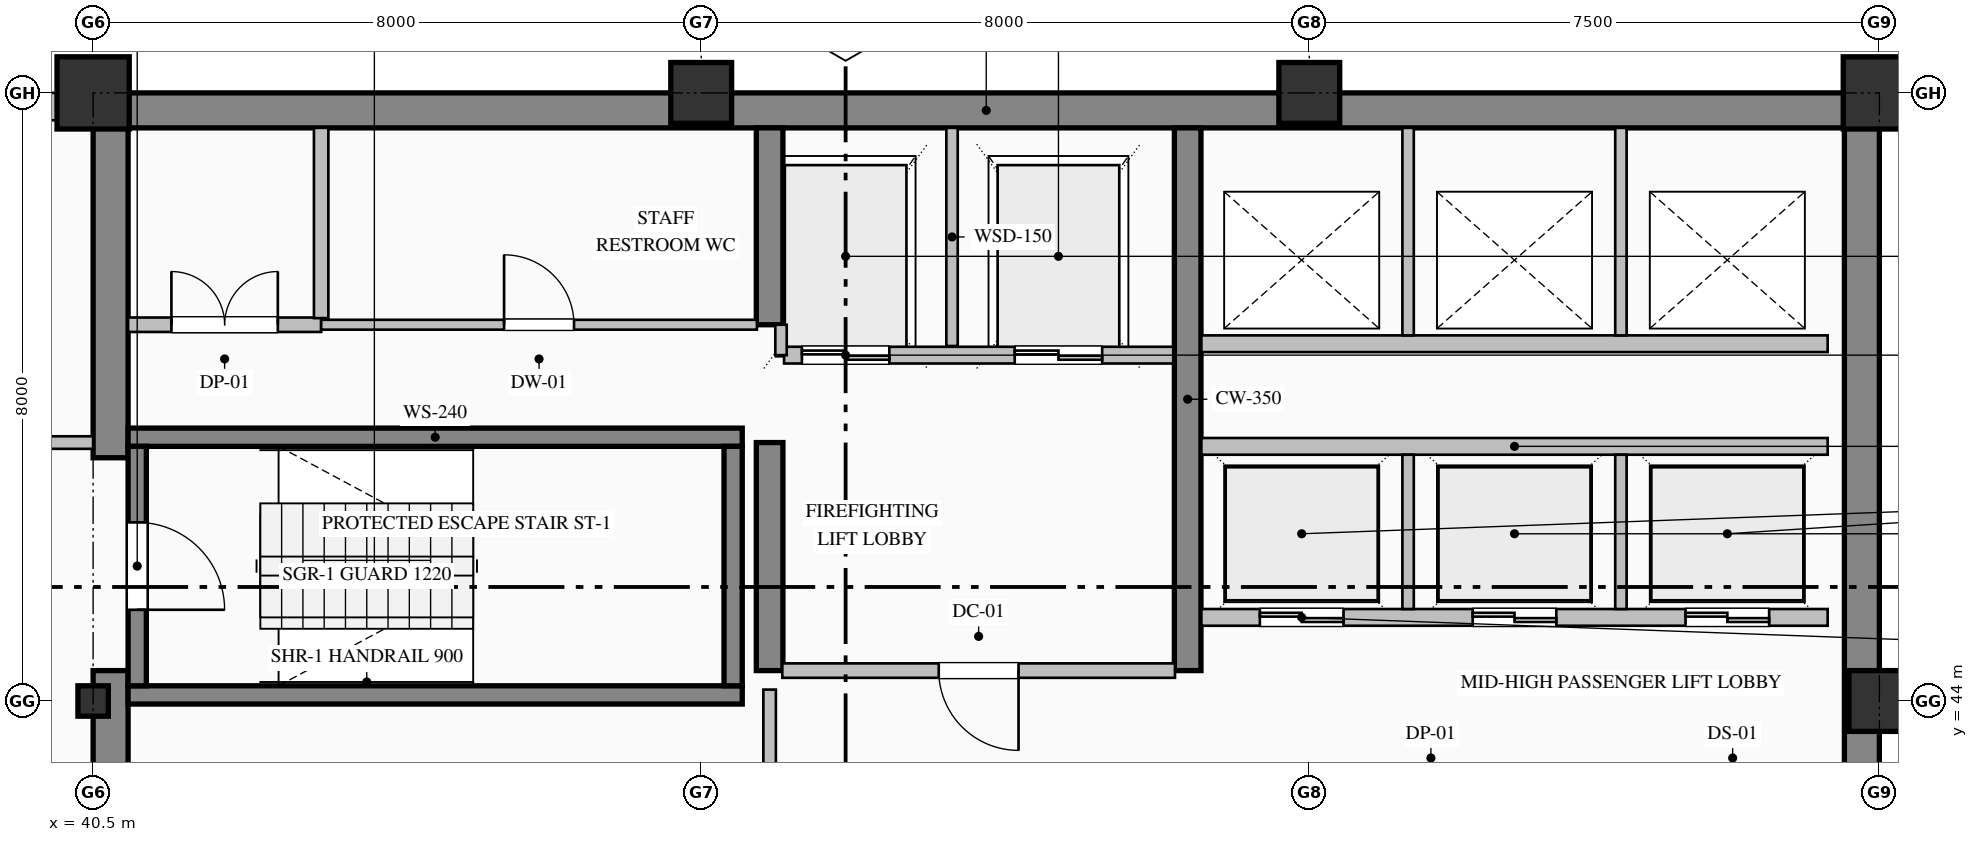
"""IFC4 building model, lengths in metres.
Left out: names, types, materials, properties, quantities, classifications, styles, units other than length and angle.
Written with IfcOpenShell. Run it as: python <this file> out.ifc"""

import sys

from ifc_helpers import new_model, si_unit, direction, frame, frame_2d, origin, origin_2d, place, context, subcontext, project, spatial, rectangle, hollow_rectangle, i_section, extrude, element, fill, save


model = new_model("IFC4")
c1 = context("Model", 3, precision=1e-05, world=origin(), true_north=direction((0.0, 1.0)))
c2 = subcontext(c1, "Body", "Model", "MODEL_VIEW")
j1 = project(units=[si_unit("LENGTHUNIT", "METRE"), si_unit("PLANEANGLEUNIT", "RADIAN")], contexts=[c1])
p1 = place(None, origin())
s1 = spatial("IfcSite", under=j1, at=p1, CompositionType="ELEMENT")
p2 = place(p1, origin())
s2 = spatial("IfcBuilding", under=s1, at=p2, CompositionType="ELEMENT")
p3 = place(p2, frame((0.0, 0.0, 229.8)))
s3 = spatial("IfcBuildingStorey", under=s2, at=p3, CompositionType="ELEMENT", Elevation=229.8)
p4 = place(p3, frame((40.5, 51.77, 0.0), z_axis=(0.0, 0.0, 1.0), x_axis=(1.0, 0.0, 0.0)))
e1 = element("IfcWall", 1, at=p4, inside=s3, PredefinedType="SHEAR", context=c2, shape_type="SweptSolid", body=[
    extrude(rectangle(XDim=23.5, YDim=0.46, at=frame_2d((11.75, 0.0))), origin(), (0.0, 0.0, 1.0), 3.775),
])
p5 = place(p3, frame((63.77, 36.32, 0.0), z_axis=(0.0, 0.0, 1.0), x_axis=(0.0, 1.0, 0.0)))
e2 = element("IfcWall", 2, at=p5, inside=s3, PredefinedType="SHEAR", context=c2, shape_type="SweptSolid", body=[
    extrude(rectangle(XDim=15.22, YDim=0.46, at=frame_2d((7.61, 0.0))), origin(), (0.0, 0.0, 1.0), 3.775),
])
p6 = place(p3, frame((40.73, 36.46, 0.0), z_axis=(0.0, 0.0, 1.0), x_axis=(0.0, 1.0, 0.0)))
e3 = element("IfcWall", 3, at=p6, inside=s3, PredefinedType="SHEAR", context=c2, shape_type="SweptSolid", body=[
    extrude(rectangle(XDim=7.94, YDim=0.46, at=frame_2d((3.97, 0.0))), origin(), (0.0, 0.0, 1.0), 3.775),
])
p7 = place(p3, frame((40.73, 47.2, 0.0), z_axis=(0.0, 0.0, 1.0), x_axis=(0.0, 1.0, 0.0)))
e4 = element("IfcWall", 4, at=p7, inside=s3, PredefinedType="SHEAR", context=c2, shape_type="SweptSolid", body=[
    extrude(rectangle(XDim=4.34, YDim=0.46, at=frame_2d((2.17, 0.0))), origin(), (0.0, 0.0, 1.0), 3.775),
])
p8 = place(p3, frame((49.4, 44.4, 0.0), z_axis=(0.0, 0.0, 1.0), x_axis=(0.0, 1.0, 0.0)))
e5 = element("IfcWall", 5, at=p8, inside=s3, PredefinedType="SHEAR", context=c2, shape_type="SweptSolid", body=[
    extrude(rectangle(XDim=3.0, YDim=0.35, at=frame_2d((1.5, 0.0))), origin(), (0.0, 0.0, 1.0), 3.775),
])
p9 = place(p3, frame((49.4, 48.95, 0.0), z_axis=(0.0, 0.0, 1.0), x_axis=(0.0, 1.0, 0.0)))
e6 = element("IfcWall", 6, at=p9, inside=s3, PredefinedType="SHEAR", context=c2, shape_type="SweptSolid", body=[
    extrude(rectangle(XDim=2.59, YDim=0.35, at=frame_2d((1.295, 0.0))), origin(), (0.0, 0.0, 1.0), 3.775),
])
p10 = place(p3, frame((54.9, 44.4, 0.0), z_axis=(0.0, 0.0, 1.0), x_axis=(0.0, 1.0, 0.0)))
e7 = element("IfcWall", 7, at=p10, inside=s3, PredefinedType="SHEAR", context=c2, shape_type="SweptSolid", body=[
    extrude(rectangle(XDim=7.14, YDim=0.35, at=frame_2d((3.57, 0.0))), origin(), (0.0, 0.0, 1.0), 3.775),
])
p11 = place(p3, frame((40.5, 44.0, 0.0), z_axis=(0.0, 0.0, 1.0), x_axis=(1.0, 0.0, 0.0)))
e8 = element("IfcColumn", 8, at=p11, inside=s3, PredefinedType="COLUMN", context=c2, shape_type="SweptSolid", body=[
    extrude(i_section(OverallWidth=0.4, OverallDepth=0.4, WebThickness=0.013, FlangeThickness=0.021, FilletRadius=0.022, at=origin_2d()), origin(), (0.0, 0.0, 1.0), 4.0),
])
p12 = place(p3, frame((40.5, 52.0, 0.0), z_axis=(0.0, 0.0, 1.0), x_axis=(1.0, 0.0, 0.0)))
e9 = element("IfcColumn", 9, at=p12, inside=s3, PredefinedType="COLUMN", context=c2, shape_type="SweptSolid", body=[
    extrude(hollow_rectangle(XDim=0.95, YDim=0.95, WallThickness=0.036, at=origin_2d()), origin(), (0.0, 0.0, 1.0), 4.0),
])
for number, where, z_axis, x_axis in (
    (10, (48.5, 52.0, 0.0), (0.0, 0.0, 1.0), (1.0, 0.0, 0.0)),
    (11, (56.5, 52.0, 0.0), (0.0, 0.0, 1.0), (1.0, 0.0, 0.0)),
    (12, (64.0, 44.0, 0.0), (0.0, 0.0, 1.0), (1.0, 0.0, 0.0)),
):
    element("IfcColumn", number, at=place(p3, frame(where, z_axis=z_axis, x_axis=x_axis)), inside=s3, PredefinedType="COLUMN", context=c2, shape_type="SweptSolid", body=[
        extrude(hollow_rectangle(XDim=0.8, YDim=0.8, WallThickness=0.032, at=origin_2d()), origin(), (0.0, 0.0, 1.0), 4.0),
    ])
p13 = place(p3, frame((64.0, 52.0, 0.0), z_axis=(0.0, 0.0, 1.0), x_axis=(1.0, 0.0, 0.0)))
e13 = element("IfcColumn", 13, at=p13, inside=s3, PredefinedType="COLUMN", context=c2, shape_type="SweptSolid", body=[
    extrude(hollow_rectangle(XDim=0.95, YDim=0.95, WallThickness=0.036, at=origin_2d()), origin(), (0.0, 0.0, 1.0), 4.0),
])
p14 = place(p3, frame((13.0, 51.82, 0.0), z_axis=(0.0, 0.0, 1.0), x_axis=(1.0, 0.0, 0.0)))
e14 = element("IfcWall", 14, at=p14, inside=s3, PredefinedType="SOLIDWALL", context=c2, shape_type="SweptSolid", body=[
    extrude(rectangle(XDim=27.52, YDim=0.36, at=frame_2d((13.76, 0.0))), origin(), (0.0, 0.0, 1.0), 3.325),
])
p15 = place(p14, frame((6.525, 0.0, 0.9)))
e15 = element("IfcOpeningElement", 15, at=p15, cuts=e14, PredefinedType="OPENING", context=c2, shape_type="SweptSolid", body=[
    extrude(rectangle(XDim=1.35, YDim=1.85, at=frame_2d((0.675, 0.925))), frame((0.0, 0.19, 0.0), z_axis=(0.0, -1.0, 0.0), x_axis=(1.0, 0.0, 0.0)), (0.0, 0.0, 1.0), 0.38),
])
for number, where, z_axis, x_axis in (
    (16, (40.96, 47.47, 0.0), (0.0, 0.0, 1.0), (1.0, 0.0, 0.0)),
    (17, (49.04, 44.08, 0.0), (0.0, 0.0, 1.0), (-1.0, 0.0, 0.0)),
):
    element("IfcWall", number, at=place(p3, frame(where, z_axis=z_axis, x_axis=x_axis)), inside=s3, PredefinedType="SOLIDWALL", context=c2, shape_type="SweptSolid", body=[
        extrude(rectangle(XDim=8.08, YDim=0.24, at=frame_2d((4.04, 0.0))), origin(), (0.0, 0.0, 1.0), 4.0),
    ])
p16 = place(p3, frame((41.08, 47.35, 0.0), z_axis=(0.0, 0.0, 1.0), x_axis=(0.0, -1.0, 0.0)))
e18 = element("IfcWall", 18, at=p16, inside=s3, PredefinedType="SOLIDWALL", context=c2, shape_type="SweptSolid", body=[
    extrude(rectangle(XDim=3.15, YDim=0.24, at=frame_2d((1.575, 0.0))), origin(), (0.0, 0.0, 1.0), 4.0),
])
p17 = place(p16, frame((1.0, 0.0, 0.0)))
e19 = element("IfcOpeningElement", 19, at=p17, cuts=e18, PredefinedType="OPENING", context=c2, shape_type="SweptSolid", body=[
    extrude(rectangle(XDim=1.15, YDim=2.2, at=frame_2d((0.575, 1.1))), frame((0.0, 0.13, 0.0), z_axis=(0.0, -1.0, 0.0), x_axis=(1.0, 0.0, 0.0)), (0.0, 0.0, 1.0), 0.26),
])
p18 = place(p3, frame((48.92, 44.2, 0.0), z_axis=(0.0, 0.0, 1.0), x_axis=(0.0, 1.0, 0.0)))
e20 = element("IfcWall", 20, at=p18, inside=s3, PredefinedType="SOLIDWALL", context=c2, shape_type="SweptSolid", body=[
    extrude(rectangle(XDim=3.15, YDim=0.24, at=frame_2d((1.575, 0.0))), origin(), (0.0, 0.0, 1.0), 4.0),
])
p19 = place(p3, frame((54.71, 48.55, 0.0), z_axis=(0.0, 0.0, 1.0), x_axis=(-1.0, 0.0, 0.0)))
e21 = element("IfcWall", 21, at=p19, inside=s3, PredefinedType="PARTITIONING", context=c2, shape_type="SweptSolid", body=[
    extrude(rectangle(XDim=5.12, YDim=0.22, at=frame_2d((2.56, 0.0))), origin(), (0.0, 0.0, 1.0), 3.775),
])
p20 = place(p19, frame((3.735, 0.0, 0.0)))
e22 = element("IfcOpeningElement", 22, at=p20, cuts=e21, PredefinedType="OPENING", context=c2, shape_type="SweptSolid", body=[
    extrude(rectangle(XDim=1.15, YDim=2.2, at=frame_2d((0.575, 1.1))), frame((0.0, 0.12, 0.0), z_axis=(0.0, -1.0, 0.0), x_axis=(1.0, 0.0, 0.0)), (0.0, 0.0, 1.0), 0.24),
])
p21 = place(p19, frame((0.935, 0.0, 0.0)))
e23 = element("IfcOpeningElement", 23, at=p21, cuts=e21, PredefinedType="OPENING", context=c2, shape_type="SweptSolid", body=[
    extrude(rectangle(XDim=1.15, YDim=2.2, at=frame_2d((0.575, 1.1))), frame((0.0, 0.12, 0.0), z_axis=(0.0, -1.0, 0.0), x_axis=(1.0, 0.0, 0.0)), (0.0, 0.0, 1.0), 0.24),
])
p22 = place(p3, frame((51.8, 48.67, 0.0), z_axis=(0.0, 0.0, 1.0), x_axis=(0.0, 1.0, 0.0)))
e24 = element("IfcWall", 24, at=p22, inside=s3, PredefinedType="PARTITIONING", context=c2, shape_type="SweptSolid", body=[
    extrude(rectangle(XDim=2.87, YDim=0.15, at=frame_2d((1.435, 0.0))), origin(), (0.0, 0.0, 1.0), 3.775),
])
p23 = place(p3, frame((49.55, 48.55, 0.0), z_axis=(0.0, 0.0, 1.0), x_axis=(0.0, 1.0, 0.0)))
e25 = element("IfcWall", 25, at=p23, inside=s3, PredefinedType="PARTITIONING", context=c2, shape_type="SweptSolid", body=[
    extrude(rectangle(XDim=0.4, YDim=0.15, at=frame_2d((0.2, 0.0))), origin(), (0.0, 0.0, 1.0), 3.775),
])
p24 = place(p3, frame((63.32, 45.1, 0.0), z_axis=(0.0, 0.0, 1.0), x_axis=(-1.0, 0.0, 0.0)))
e26 = element("IfcWall", 26, at=p24, inside=s3, PredefinedType="PARTITIONING", context=c2, shape_type="SweptSolid", body=[
    extrude(rectangle(XDim=8.24, YDim=0.22, at=frame_2d((4.12, 0.0))), origin(), (0.0, 0.0, 1.0), 3.775),
])
p25 = place(p24, frame((6.37, 0.0, 0.0)))
e27 = element("IfcOpeningElement", 27, at=p25, cuts=e26, PredefinedType="OPENING", context=c2, shape_type="SweptSolid", body=[
    extrude(rectangle(XDim=1.1, YDim=2.2, at=frame_2d((0.55, 1.1))), frame((0.0, 0.12, 0.0), z_axis=(0.0, -1.0, 0.0), x_axis=(1.0, 0.0, 0.0)), (0.0, 0.0, 1.0), 0.24),
])
p26 = place(p24, frame((3.57, 0.0, 0.0)))
e28 = element("IfcOpeningElement", 28, at=p26, cuts=e26, PredefinedType="OPENING", context=c2, shape_type="SweptSolid", body=[
    extrude(rectangle(XDim=1.1, YDim=2.2, at=frame_2d((0.55, 1.1))), frame((0.0, 0.12, 0.0), z_axis=(0.0, -1.0, 0.0), x_axis=(1.0, 0.0, 0.0)), (0.0, 0.0, 1.0), 0.24),
])
p27 = place(p24, frame((0.77, 0.0, 0.0)))
e29 = element("IfcOpeningElement", 29, at=p27, cuts=e26, PredefinedType="OPENING", context=c2, shape_type="SweptSolid", body=[
    extrude(rectangle(XDim=1.1, YDim=2.2, at=frame_2d((0.55, 1.1))), frame((0.0, 0.12, 0.0), z_axis=(0.0, -1.0, 0.0), x_axis=(1.0, 0.0, 0.0)), (0.0, 0.0, 1.0), 0.24),
])
p28 = place(p3, frame((55.08, 47.35, 0.0), z_axis=(0.0, 0.0, 1.0), x_axis=(1.0, 0.0, 0.0)))
e30 = element("IfcWall", 30, at=p28, inside=s3, PredefinedType="PARTITIONING", context=c2, shape_type="SweptSolid", body=[
    extrude(rectangle(XDim=8.24, YDim=0.22, at=frame_2d((4.12, 0.0))), origin(), (0.0, 0.0, 1.0), 3.775),
])
for number, where, z_axis, x_axis in (
    (31, (57.8, 45.21, 0.0), (0.0, 0.0, 1.0), (0.0, 1.0, 0.0)),
    (32, (60.6, 45.21, 0.0), (0.0, 0.0, 1.0), (0.0, 1.0, 0.0)),
):
    element("IfcWall", number, at=place(p3, frame(where, z_axis=z_axis, x_axis=x_axis)), inside=s3, PredefinedType="PARTITIONING", context=c2, shape_type="SweptSolid", body=[
        extrude(rectangle(XDim=2.03, YDim=0.15, at=frame_2d((1.015, 0.0))), origin(), (0.0, 0.0, 1.0), 3.775),
    ])
p29 = place(p3, frame((63.32, 48.7, 0.0), z_axis=(0.0, 0.0, 1.0), x_axis=(-1.0, 0.0, 0.0)))
e33 = element("IfcWall", 33, at=p29, inside=s3, PredefinedType="PARTITIONING", context=c2, shape_type="SweptSolid", body=[
    extrude(rectangle(XDim=8.24, YDim=0.22, at=frame_2d((4.12, 0.0))), origin(), (0.0, 0.0, 1.0), 3.775),
])
for number, where, z_axis, x_axis in (
    (34, (57.8, 48.81, 0.0), (0.0, 0.0, 1.0), (0.0, 1.0, 0.0)),
    (35, (60.6, 48.81, 0.0), (0.0, 0.0, 1.0), (0.0, 1.0, 0.0)),
):
    element("IfcWall", number, at=place(p3, frame(where, z_axis=z_axis, x_axis=x_axis)), inside=s3, PredefinedType="PARTITIONING", context=c2, shape_type="SweptSolid", body=[
        extrude(rectangle(XDim=2.73, YDim=0.15, at=frame_2d((1.365, 0.0))), origin(), (0.0, 0.0, 1.0), 3.775),
    ])
p30 = place(p3, frame((37.8, 47.4, 0.0), z_axis=(0.0, 0.0, 1.0), x_axis=(1.0, 0.0, 0.0)))
e36 = element("IfcWall", 36, at=p30, inside=s3, PredefinedType="PARTITIONING", context=c2, shape_type="SweptSolid", body=[
    extrude(rectangle(XDim=2.7, YDim=0.165, at=frame_2d((1.35, 0.0))), origin(), (0.0, 0.0, 1.0), 3.775),
])
p31 = place(p30, frame((0.825, 0.0, 0.0)))
e37 = element("IfcOpeningElement", 37, at=p31, cuts=e36, PredefinedType="OPENING", context=c2, shape_type="SweptSolid", body=[
    extrude(rectangle(XDim=1.05, YDim=2.15, at=frame_2d((0.525, 1.075))), frame((0.0, 0.093, 0.0), z_axis=(0.0, -1.0, 0.0), x_axis=(1.0, 0.0, 0.0)), (0.0, 0.0, 1.0), 0.185),
])
p32 = place(p3, frame((40.96, 48.95, 0.0), z_axis=(0.0, 0.0, 1.0), x_axis=(1.0, 0.0, 0.0)))
e38 = element("IfcWall", 38, at=p32, inside=s3, PredefinedType="PARTITIONING", context=c2, shape_type="SweptSolid", body=[
    extrude(rectangle(XDim=2.54, YDim=0.19, at=frame_2d((1.27, 0.0))), origin(), (0.0, 0.0, 1.0), 3.775),
])
p33 = place(p32, frame((0.57, 0.0, 0.0)))
e39 = element("IfcOpeningElement", 39, at=p33, cuts=e38, PredefinedType="OPENING", context=c2, shape_type="SweptSolid", body=[
    extrude(rectangle(XDim=1.4, YDim=2.25, at=frame_2d((0.7, 1.125))), frame((0.0, 0.105, 0.0), z_axis=(0.0, -1.0, 0.0), x_axis=(1.0, 0.0, 0.0)), (0.0, 0.0, 1.0), 0.21),
])
p34 = place(p3, frame((43.5, 48.95, 0.0), z_axis=(0.0, 0.0, 1.0), x_axis=(1.0, 0.0, 0.0)))
e40 = element("IfcWall", 40, at=p34, inside=s3, PredefinedType="PARTITIONING", context=c2, shape_type="SweptSolid", body=[
    extrude(rectangle(XDim=5.733, YDim=0.13, at=frame_2d((2.866, 0.0))), origin(), (0.0, 0.0, 1.0), 3.775),
])
p35 = place(p34, frame((2.406, 0.0, 0.0)))
e41 = element("IfcOpeningElement", 41, at=p35, cuts=e40, PredefinedType="OPENING", context=c2, shape_type="SweptSolid", body=[
    extrude(rectangle(XDim=0.92, YDim=2.15, at=frame_2d((0.46, 1.075))), frame((0.0, 0.075, 0.0), z_axis=(0.0, -1.0, 0.0), x_axis=(1.0, 0.0, 0.0)), (0.0, 0.0, 1.0), 0.15),
])
p36 = place(p3, frame((54.733, 44.4, 0.0), z_axis=(0.0, 0.0, 1.0), x_axis=(-1.0, 0.0, 0.0)))
e42 = element("IfcWall", 42, at=p36, inside=s3, PredefinedType="PARTITIONING", context=c2, shape_type="SweptSolid", body=[
    extrude(rectangle(XDim=5.166, YDim=0.19, at=frame_2d((2.583, 0.0))), origin(), (0.0, 0.0, 1.0), 3.775),
])
p37 = place(p36, frame((2.058, 0.0, 0.0)))
e43 = element("IfcOpeningElement", 43, at=p37, cuts=e42, PredefinedType="OPENING", context=c2, shape_type="SweptSolid", body=[
    extrude(rectangle(XDim=1.05, YDim=2.15, at=frame_2d((0.525, 1.075))), frame((0.0, 0.105, 0.0), z_axis=(0.0, -1.0, 0.0), x_axis=(1.0, 0.0, 0.0)), (0.0, 0.0, 1.0), 0.21),
])
p38 = place(p3, frame((49.4, 36.46, 0.0), z_axis=(0.0, 0.0, 1.0), x_axis=(0.0, 1.0, 0.0)))
e44 = element("IfcWall", 44, at=p38, inside=s3, PredefinedType="PARTITIONING", context=c2, shape_type="SweptSolid", body=[
    extrude(rectangle(XDim=7.69, YDim=0.165, at=frame_2d((3.845, 0.0))), origin(), (0.0, 0.0, 1.0), 3.017),
])
p39 = place(p38, frame((3.345, 0.0, 0.0)))
e45 = element("IfcOpeningElement", 45, at=p39, cuts=e44, PredefinedType="OPENING", context=c2, shape_type="SweptSolid", body=[
    extrude(rectangle(XDim=1.0, YDim=2.15, at=frame_2d((0.5, 1.075))), frame((0.0, 0.093, 0.0), z_axis=(0.0, -1.0, 0.0), x_axis=(1.0, 0.0, 0.0)), (0.0, 0.0, 1.0), 0.185),
])
p40 = place(p3, frame((43.5, 51.54, 0.0), z_axis=(0.0, 0.0, 1.0), x_axis=(0.0, -1.0, 0.0)))
e46 = element("IfcWall", 46, at=p40, inside=s3, PredefinedType="PARTITIONING", context=c2, shape_type="SweptSolid", body=[
    extrude(rectangle(XDim=2.503, YDim=0.19, at=frame_2d((1.251, 0.0))), origin(), (0.0, 0.0, 1.0), 3.775),
])
p41 = place(p17, origin())
e47 = element("IfcDoor", 47, at=p41, inside=s3, OperationType="SINGLE_SWING_RIGHT", PredefinedType="DOOR", context=c2, shape_type="SweptSolid", body=[
    extrude(rectangle(XDim=1.15, YDim=2.2, at=frame_2d((0.575, 1.1))), frame((0.0, 0.025, 0.0), z_axis=(0.0, -1.0, 0.0), x_axis=(1.0, 0.0, 0.0)), (0.0, 0.0, 1.0), 0.05),
])
fill(e19, e47)
p42 = place(p20, origin())
e48 = element("IfcDoor", 48, at=p42, inside=s3, OperationType="DOUBLE_DOOR_SLIDING", PredefinedType="DOOR", context=c2, shape_type="SweptSolid", body=[
    extrude(rectangle(XDim=1.15, YDim=2.2, at=frame_2d((0.575, 1.1))), frame((0.0, 0.025, 0.0), z_axis=(0.0, -1.0, 0.0), x_axis=(1.0, 0.0, 0.0)), (0.0, 0.0, 1.0), 0.05),
])
fill(e22, e48)
p43 = place(p21, origin())
e49 = element("IfcDoor", 49, at=p43, inside=s3, OperationType="DOUBLE_DOOR_SLIDING", PredefinedType="DOOR", context=c2, shape_type="SweptSolid", body=[
    extrude(rectangle(XDim=1.15, YDim=2.2, at=frame_2d((0.575, 1.1))), frame((0.0, 0.025, 0.0), z_axis=(0.0, -1.0, 0.0), x_axis=(1.0, 0.0, 0.0)), (0.0, 0.0, 1.0), 0.05),
])
fill(e23, e49)
p44 = place(p25, origin())
e50 = element("IfcDoor", 50, at=p44, inside=s3, OperationType="DOUBLE_DOOR_SLIDING", PredefinedType="DOOR", context=c2, shape_type="SweptSolid", body=[
    extrude(rectangle(XDim=1.1, YDim=2.2, at=frame_2d((0.55, 1.1))), frame((0.0, 0.025, 0.0), z_axis=(0.0, -1.0, 0.0), x_axis=(1.0, 0.0, 0.0)), (0.0, 0.0, 1.0), 0.05),
])
fill(e27, e50)
p45 = place(p26, origin())
e51 = element("IfcDoor", 51, at=p45, inside=s3, OperationType="DOUBLE_DOOR_SLIDING", PredefinedType="DOOR", context=c2, shape_type="SweptSolid", body=[
    extrude(rectangle(XDim=1.1, YDim=2.2, at=frame_2d((0.55, 1.1))), frame((0.0, 0.025, 0.0), z_axis=(0.0, -1.0, 0.0), x_axis=(1.0, 0.0, 0.0)), (0.0, 0.0, 1.0), 0.05),
])
fill(e28, e51)
p46 = place(p27, origin())
e52 = element("IfcDoor", 52, at=p46, inside=s3, OperationType="DOUBLE_DOOR_SLIDING", PredefinedType="DOOR", context=c2, shape_type="SweptSolid", body=[
    extrude(rectangle(XDim=1.1, YDim=2.2, at=frame_2d((0.55, 1.1))), frame((0.0, 0.025, 0.0), z_axis=(0.0, -1.0, 0.0), x_axis=(1.0, 0.0, 0.0)), (0.0, 0.0, 1.0), 0.05),
])
fill(e29, e52)
p47 = place(p37, origin())
e53 = element("IfcDoor", 53, at=p47, inside=s3, OperationType="SINGLE_SWING_LEFT", PredefinedType="DOOR", context=c2, shape_type="SweptSolid", body=[
    extrude(rectangle(XDim=1.05, YDim=2.15, at=frame_2d((0.525, 1.075))), frame((0.0, 0.025, 0.0), z_axis=(0.0, -1.0, 0.0), x_axis=(1.0, 0.0, 0.0)), (0.0, 0.0, 1.0), 0.05),
])
fill(e43, e53)
p48 = place(p33, origin())
e54 = element("IfcDoor", 54, at=p48, inside=s3, OperationType="DOUBLE_DOOR_SINGLE_SWING", PredefinedType="DOOR", context=c2, shape_type="SweptSolid", body=[
    extrude(rectangle(XDim=1.4, YDim=2.25, at=frame_2d((0.7, 1.125))), frame((0.0, 0.025, 0.0), z_axis=(0.0, -1.0, 0.0), x_axis=(1.0, 0.0, 0.0)), (0.0, 0.0, 1.0), 0.05),
])
fill(e39, e54)
p49 = place(p35, origin())
e55 = element("IfcDoor", 55, at=p49, inside=s3, OperationType="SINGLE_SWING_LEFT", PredefinedType="DOOR", context=c2, shape_type="SweptSolid", body=[
    extrude(rectangle(XDim=0.92, YDim=2.15, at=frame_2d((0.46, 1.075))), frame((0.0, 0.025, 0.0), z_axis=(0.0, -1.0, 0.0), x_axis=(1.0, 0.0, 0.0)), (0.0, 0.0, 1.0), 0.05),
])
fill(e41, e55)
save(model, sys.argv[1])
